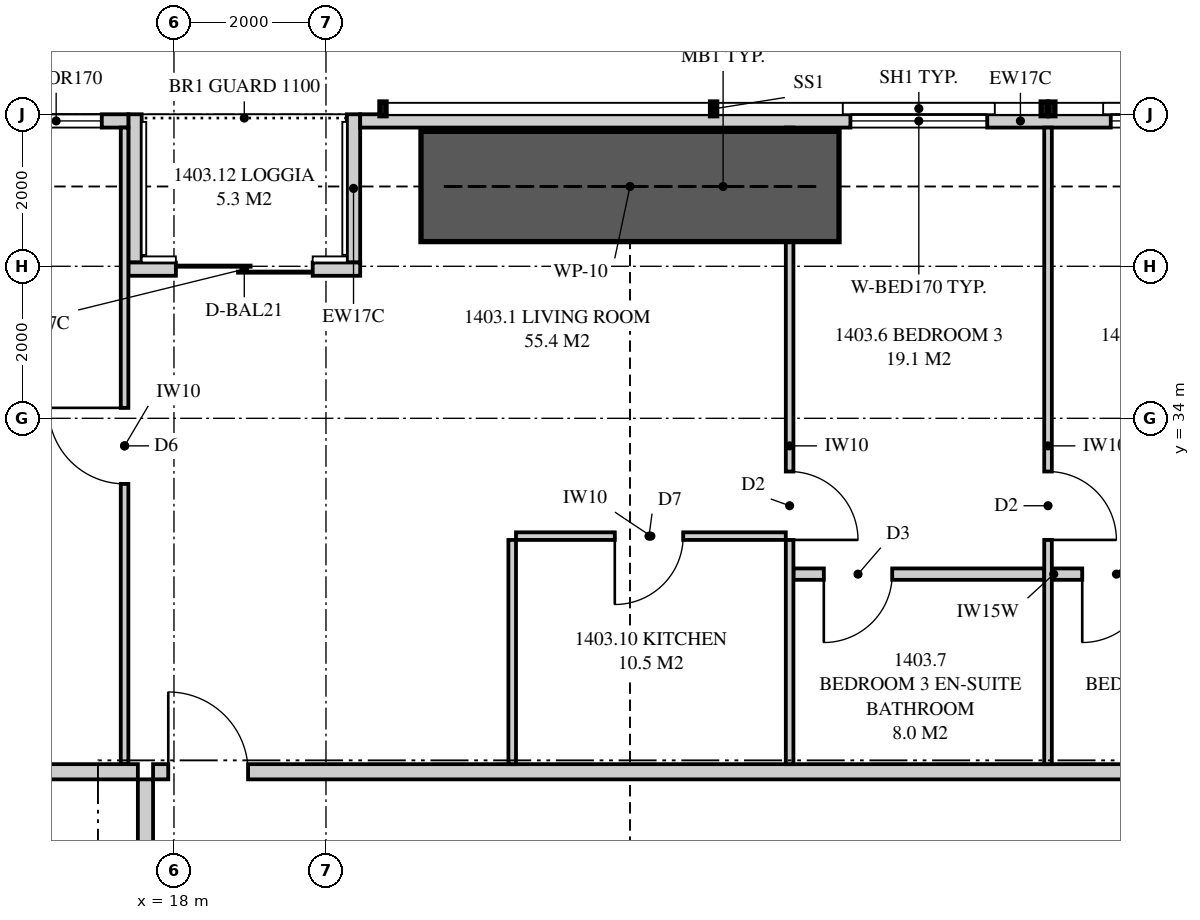
"""IFC4 building model, lengths in metres.
Left out: names, types, materials, properties, quantities, classifications, styles, units other than length and angle.
Written with IfcOpenShell. Run it as: python <this file> out.ifc"""

import sys

from ifc_helpers import new_model, si_unit, direction, frame, frame_2d, origin, place, context, subcontext, project, spatial, polyline, rectangle, outline, extrude, element, fill, save


model = new_model("IFC4")
c1 = context("Model", 3, precision=1e-05, world=origin(), true_north=direction((0.0, 1.0)))
c2 = subcontext(c1, "Body", "Model", "MODEL_VIEW")
j1 = project(units=[si_unit("LENGTHUNIT", "METRE"), si_unit("PLANEANGLEUNIT", "RADIAN")], contexts=[c1])
p1 = place(None, origin())
s1 = spatial("IfcSite", under=j1, at=p1, CompositionType="ELEMENT")
p2 = place(p1, origin())
s2 = spatial("IfcBuilding", under=s1, at=p2, CompositionType="ELEMENT")
p3 = place(p2, frame((0.0, 0.0, 54.5)))
s3 = spatial("IfcBuildingStorey", under=s2, at=p3, CompositionType="ELEMENT", Elevation=54.5)
p4 = place(p3, frame((37.824, 37.913, 0.0), z_axis=(0.0, 0.0, 1.0), x_axis=(-1.0, 0.0, 0.0)))
e1 = element("IfcWall", 1, at=p4, inside=s3, PredefinedType="SOLIDWALL", context=c2, shape_type="SweptSolid", body=[
    extrude(outline(polyline([(0.0, 0.0), (17.374, 0.0), (17.374, 2.15), (2.824, 2.15), (2.824, 3.11), (2.668, 3.11), (2.668, 2.15), (2.62, 2.15), (2.62, 3.11), (0.0, 3.11), (0.0, 0.0)])), frame((0.0, 0.087, 0.0), z_axis=(0.0, -1.0, 0.0), x_axis=(1.0, 0.0, 0.0)), (0.0, 0.0, 1.0), 0.175),
])
p5 = place(p4, frame((5.699, 0.0, 0.4)))
e2 = element("IfcOpeningElement", 2, at=p5, cuts=e1, PredefinedType="OPENING", context=c2, shape_type="SweptSolid", body=[
    extrude(rectangle(XDim=1.8, YDim=1.7, at=frame_2d((0.9, 0.85))), frame((0.0, 0.097, 0.0), z_axis=(0.0, -1.0, 0.0), x_axis=(1.0, 0.0, 0.0)), (0.0, 0.0, 1.0), 0.195),
])
p6 = place(p4, frame((9.124, 0.0, 0.4)))
e3 = element("IfcOpeningElement", 3, at=p6, cuts=e1, PredefinedType="OPENING", context=c2, shape_type="SweptSolid", body=[
    extrude(rectangle(XDim=1.8, YDim=1.7, at=frame_2d((0.9, 0.85))), frame((0.0, 0.097, 0.0), z_axis=(0.0, -1.0, 0.0), x_axis=(1.0, 0.0, 0.0)), (0.0, 0.0, 1.0), 0.195),
])
p7 = place(p3, frame((17.4, 37.913, 0.0), z_axis=(0.0, 0.0, 1.0), x_axis=(-1.0, 0.0, 0.0)))
e4 = element("IfcWall", 4, at=p7, inside=s3, PredefinedType="SOLIDWALL", context=c2, shape_type="SweptSolid", body=[
    extrude(outline(polyline([(0.0, 0.0), (12.349, 0.0), (12.349, 3.11), (4.604, 3.11), (4.604, 2.15), (4.556, 2.15), (4.556, 3.11), (4.4, 3.11), (4.4, 2.15), (0.0, 2.15), (0.0, 0.0)])), frame((0.0, 0.087, 0.0), z_axis=(0.0, -1.0, 0.0), x_axis=(1.0, 0.0, 0.0)), (0.0, 0.0, 1.0), 0.175),
])
p8 = place(p7, frame((0.35, 0.0, 0.4)))
e5 = element("IfcOpeningElement", 5, at=p8, cuts=e4, PredefinedType="OPENING", context=c2, shape_type="SweptSolid", body=[
    extrude(rectangle(XDim=1.2, YDim=1.7, at=frame_2d((0.6, 0.85))), frame((0.0, 0.097, 0.0), z_axis=(0.0, -1.0, 0.0), x_axis=(1.0, 0.0, 0.0)), (0.0, 0.0, 1.0), 0.195),
])
p9 = place(p7, frame((8.3, 0.0, 0.4)))
e6 = element("IfcOpeningElement", 6, at=p9, cuts=e4, PredefinedType="OPENING", context=c2, shape_type="SweptSolid", body=[
    extrude(rectangle(XDim=1.8, YDim=1.7, at=frame_2d((0.9, 0.85))), frame((0.0, 0.097, 0.0), z_axis=(0.0, -1.0, 0.0), x_axis=(1.0, 0.0, 0.0)), (0.0, 0.0, 1.0), 0.195),
])
p10 = place(p3, frame((20.45, 35.962, 0.0), z_axis=(0.0, 0.0, 1.0), x_axis=(-1.0, 0.0, 0.0)))
e7 = element("IfcWall", 7, at=p10, inside=s3, PredefinedType="SOLIDWALL", context=c2, shape_type="SweptSolid", body=[
    extrude(rectangle(XDim=3.05, YDim=0.175, at=frame_2d((1.525, 0.0))), origin(), (0.0, 0.0, 1.0), 3.11),
])
p11 = place(p10, frame((0.625, 0.0, 0.0)))
e8 = element("IfcOpeningElement", 8, at=p11, cuts=e7, PredefinedType="OPENING", context=c2, shape_type="SweptSolid", body=[
    extrude(rectangle(XDim=1.8, YDim=2.1, at=frame_2d((0.9, 1.05))), frame((0.0, 0.097, 0.0), z_axis=(0.0, -1.0, 0.0), x_axis=(1.0, 0.0, 0.0)), (0.0, 0.0, 1.0), 0.195),
])
for number, where, z_axis, x_axis in (
    (9, (20.363, 38.0, 0.0), (0.0, 0.0, 1.0), (0.0, -1.0, 0.0)),
    (10, (17.488, 38.0, 0.0), (0.0, 0.0, 1.0), (0.0, -1.0, 0.0)),
):
    element("IfcWall", number, at=place(p3, frame(where, z_axis=z_axis, x_axis=x_axis)), inside=s3, PredefinedType="SOLIDWALL", context=c2, shape_type="SweptSolid", body=[
        extrude(outline(polyline([(0.0, 0.0), (1.95, 0.0), (1.95, 3.11), (1.75, 3.11), (1.75, 2.15), (0.15, 2.15), (0.15, 3.11), (0.0, 3.11), (0.0, 0.0)])), frame((0.0, 0.087, 0.0), z_axis=(0.0, -1.0, 0.0), x_axis=(1.0, 0.0, 0.0)), (0.0, 0.0, 1.0), 0.175),
    ])
p12 = place(p3, frame((17.725, 29.35, 0.0), z_axis=(0.0, 0.0, 1.0), x_axis=(1.0, 0.0, 0.0)))
e11 = element("IfcWall", 11, at=p12, inside=s3, PredefinedType="PARTITIONING", context=c2, shape_type="SweptSolid", body=[
    extrude(outline(polyline([(0.0, 0.0), (15.275, 0.0), (15.275, 3.11), (6.612, 3.11), (6.612, 2.541), (5.938, 2.541), (5.938, 3.11), (0.0, 3.11), (0.0, 0.0)])), frame((0.0, 0.1, 0.0), z_axis=(0.0, -1.0, 0.0), x_axis=(1.0, 0.0, 0.0)), (0.0, 0.0, 1.0), 0.2),
])
p13 = place(p12, frame((0.2, 0.0, 0.0)))
e12 = element("IfcOpeningElement", 12, at=p13, cuts=e11, PredefinedType="OPENING", context=c2, shape_type="SweptSolid", body=[
    extrude(rectangle(XDim=1.05, YDim=2.2, at=frame_2d((0.525, 1.1))), frame((0.0, 0.11, 0.0), z_axis=(0.0, -1.0, 0.0), x_axis=(1.0, 0.0, 0.0)), (0.0, 0.0, 1.0), 0.22),
])
p14 = place(p3, frame((26.1, 37.825, 0.0), z_axis=(0.0, 0.0, 1.0), x_axis=(0.0, -1.0, 0.0)))
e13 = element("IfcWall", 13, at=p14, inside=s3, PredefinedType="PARTITIONING", context=c2, shape_type="SweptSolid", body=[
    extrude(outline(polyline([(0.529, 2.15), (0.0, 2.15), (0.0, 0.0), (0.529, 0.0), (0.529, 0.034), (1.021, 0.034), (1.021, 0.0), (8.375, 0.0), (8.375, 3.11), (1.635, 3.11), (1.635, 2.15), (1.021, 2.15), (1.021, 2.116), (0.529, 2.116), (0.529, 2.15)])), frame((0.0, 0.05, 0.0), z_axis=(0.0, -1.0, 0.0), x_axis=(1.0, 0.0, 0.0)), (0.0, 0.0, 1.0), 0.1),
])
p15 = place(p14, frame((4.525, 0.0, 0.0)))
e14 = element("IfcOpeningElement", 14, at=p15, cuts=e13, PredefinedType="OPENING", context=c2, shape_type="SweptSolid", body=[
    extrude(rectangle(XDim=0.9, YDim=2.1, at=frame_2d((0.45, 1.05))), frame((0.0, 0.06, 0.0), z_axis=(0.0, -1.0, 0.0), x_axis=(1.0, 0.0, 0.0)), (0.0, 0.0, 1.0), 0.12),
])
p16 = place(p3, frame((29.5, 37.825, 0.0), z_axis=(0.0, 0.0, 1.0), x_axis=(0.0, -1.0, 0.0)))
e15 = element("IfcWall", 15, at=p16, inside=s3, PredefinedType="PARTITIONING", context=c2, shape_type="SweptSolid", body=[
    extrude(outline(polyline([(0.0, 0.0), (8.375, 0.0), (8.375, 3.11), (1.635, 3.11), (1.635, 2.15), (0.0, 2.15), (0.0, 3.11), (0.0, 0.0)])), frame((0.0, 0.05, 0.0), z_axis=(0.0, -1.0, 0.0), x_axis=(1.0, 0.0, 0.0)), (0.0, 0.0, 1.0), 0.1),
])
p17 = place(p16, frame((4.525, 0.0, 0.0)))
e16 = element("IfcOpeningElement", 16, at=p17, cuts=e15, PredefinedType="OPENING", context=c2, shape_type="SweptSolid", body=[
    extrude(rectangle(XDim=0.9, YDim=2.1, at=frame_2d((0.45, 1.05))), frame((0.0, 0.06, 0.0), z_axis=(0.0, -1.0, 0.0), x_axis=(1.0, 0.0, 0.0)), (0.0, 0.0, 1.0), 0.12),
])
p18 = place(p3, frame((26.15, 31.95, 0.0), z_axis=(0.0, 0.0, 1.0), x_axis=(1.0, 0.0, 0.0)))
e17 = element("IfcWall", 17, at=p18, inside=s3, PredefinedType="PLUMBINGWALL", context=c2, shape_type="SweptSolid", body=[
    extrude(rectangle(XDim=3.3, YDim=0.15, at=frame_2d((1.65, 0.0))), origin(), (0.0, 0.0, 1.0), 3.11),
])
p19 = place(p18, frame((0.4, 0.0, 0.0)))
e18 = element("IfcOpeningElement", 18, at=p19, cuts=e17, PredefinedType="OPENING", context=c2, shape_type="SweptSolid", body=[
    extrude(rectangle(XDim=0.9, YDim=2.1, at=frame_2d((0.45, 1.05))), frame((0.0, 0.085, 0.0), z_axis=(0.0, -1.0, 0.0), x_axis=(1.0, 0.0, 0.0)), (0.0, 0.0, 1.0), 0.17),
])
p20 = place(p3, frame((29.55, 31.95, 0.0), z_axis=(0.0, 0.0, 1.0), x_axis=(1.0, 0.0, 0.0)))
e19 = element("IfcWall", 19, at=p20, inside=s3, PredefinedType="PLUMBINGWALL", context=c2, shape_type="SweptSolid", body=[
    extrude(rectangle(XDim=3.45, YDim=0.15, at=frame_2d((1.725, 0.0))), origin(), (0.0, 0.0, 1.0), 3.11),
])
p21 = place(p20, frame((0.4, 0.0, 0.0)))
e20 = element("IfcOpeningElement", 20, at=p21, cuts=e19, PredefinedType="OPENING", context=c2, shape_type="SweptSolid", body=[
    extrude(rectangle(XDim=0.9, YDim=2.1, at=frame_2d((0.45, 1.05))), frame((0.0, 0.085, 0.0), z_axis=(0.0, -1.0, 0.0), x_axis=(1.0, 0.0, 0.0)), (0.0, 0.0, 1.0), 0.17),
])
p22 = place(p3, frame((22.5, 32.45, 0.0), z_axis=(0.0, 0.0, 1.0), x_axis=(1.0, 0.0, 0.0)))
e21 = element("IfcWall", 21, at=p22, inside=s3, PredefinedType="PARTITIONING", context=c2, shape_type="SweptSolid", body=[
    extrude(outline(polyline([(0.0, 0.0), (3.55, 0.0), (3.55, 3.11), (1.787, 3.11), (1.787, 2.541), (1.213, 2.541), (1.213, 3.11), (0.0, 3.11), (0.0, 0.0)])), frame((0.0, 0.05, 0.0), z_axis=(0.0, -1.0, 0.0), x_axis=(1.0, 0.0, 0.0)), (0.0, 0.0, 1.0), 0.1),
])
p23 = place(p22, frame((1.3, 0.0, 0.0)))
e22 = element("IfcOpeningElement", 22, at=p23, cuts=e21, PredefinedType="OPENING", context=c2, shape_type="SweptSolid", body=[
    extrude(rectangle(XDim=0.9, YDim=2.1, at=frame_2d((0.45, 1.05))), frame((0.0, 0.06, 0.0), z_axis=(0.0, -1.0, 0.0), x_axis=(1.0, 0.0, 0.0)), (0.0, 0.0, 1.0), 0.12),
])
p24 = place(p3, frame((22.45, 32.4, 0.0), z_axis=(0.0, 0.0, 1.0), x_axis=(0.0, -1.0, 0.0)))
e23 = element("IfcWall", 23, at=p24, inside=s3, PredefinedType="PARTITIONING", context=c2, shape_type="SweptSolid", body=[
    extrude(rectangle(XDim=2.95, YDim=0.1, at=frame_2d((1.475, 0.0))), origin(), (0.0, 0.0, 1.0), 3.11),
])
p25 = place(p3, frame((17.35, 37.825, 0.0), z_axis=(0.0, 0.0, 1.0), x_axis=(0.0, -1.0, 0.0)))
e24 = element("IfcWall", 24, at=p25, inside=s3, PredefinedType="PARTITIONING", context=c2, shape_type="SweptSolid", body=[
    extrude(outline(polyline([(0.0, 0.0), (8.375, 0.0), (8.375, 3.11), (1.635, 3.11), (1.635, 2.15), (0.0, 2.15), (0.0, 3.11), (0.0, 0.0)])), frame((0.0, 0.05, 0.0), z_axis=(0.0, -1.0, 0.0), x_axis=(1.0, 0.0, 0.0)), (0.0, 0.0, 1.0), 0.1),
])
p26 = place(p25, frame((3.688, 0.0, 0.0)))
e25 = element("IfcOpeningElement", 25, at=p26, cuts=e24, PredefinedType="OPENING", context=c2, shape_type="SweptSolid", body=[
    extrude(rectangle(XDim=1.0, YDim=2.1, at=frame_2d((0.5, 1.05))), frame((0.0, 0.06, 0.0), z_axis=(0.0, -1.0, 0.0), x_axis=(1.0, 0.0, 0.0)), (0.0, 0.0, 1.0), 0.12),
])
p27 = place(p3, frame((2.0, 29.35, 0.0), z_axis=(0.0, 0.0, 1.0), x_axis=(1.0, 0.0, 0.0)))
e26 = element("IfcWall", 26, at=p27, inside=s3, PredefinedType="PARTITIONING", context=c2, shape_type="SweptSolid", body=[
    extrude(outline(polyline([(0.0, 0.0), (15.525, 0.0), (15.525, 3.11), (11.337, 3.11), (11.337, 2.541), (10.663, 2.541), (10.663, 3.11), (9.51, 3.11), (9.51, 2.51), (6.89, 2.51), (6.89, 3.11), (2.969, 3.11), (2.969, 2.541), (2.577, 2.541), (2.577, 2.15), (0.733, 2.15), (0.733, 3.11), (0.0, 3.11), (0.0, 0.0)])), frame((0.0, 0.1, 0.0), z_axis=(0.0, -1.0, 0.0), x_axis=(1.0, 0.0, 0.0)), (0.0, 0.0, 1.0), 0.2),
])
p28 = place(p3, frame((17.625, 24.2, 0.0), z_axis=(0.0, 0.0, 1.0), x_axis=(0.0, 1.0, 0.0)))
e27 = element("IfcWall", 27, at=p28, inside=s3, PredefinedType="PARTITIONING", context=c2, shape_type="SweptSolid", body=[
    extrude(outline(polyline([(0.0, 0.0), (5.05, 0.0), (5.05, 3.11), (1.137, 3.11), (1.137, 2.541), (0.463, 2.541), (0.463, 3.11), (0.0, 3.11), (0.0, 0.0)])), frame((0.0, 0.1, 0.0), z_axis=(0.0, -1.0, 0.0), x_axis=(1.0, 0.0, 0.0)), (0.0, 0.0, 1.0), 0.2),
])
p29 = place(p28, frame((1.075, 0.0, 0.0)))
e28 = element("IfcOpeningElement", 28, at=p29, cuts=e27, PredefinedType="OPENING", context=c2, shape_type="SweptSolid", body=[
    extrude(rectangle(XDim=1.8, YDim=2.1, at=frame_2d((0.9, 1.05))), frame((0.0, 0.11, 0.0), z_axis=(0.0, -1.0, 0.0), x_axis=(1.0, 0.0, 0.0)), (0.0, 0.0, 1.0), 0.22),
])
p30 = place(p3, frame((21.25, 37.05, 0.0), z_axis=(0.0, 0.0, 1.0), x_axis=(1.0, 0.0, 0.0)))
e29 = element("IfcWall", 29, at=p30, inside=s3, PredefinedType="SHEAR", context=c2, shape_type="SweptSolid", body=[
    extrude(rectangle(XDim=5.5, YDim=1.45, at=frame_2d((2.75, 0.0))), origin(), (0.0, 0.0, 1.0), 3.35),
])
p31 = place(p5, origin())
e30 = element("IfcWindow", 30, at=p31, inside=s3, PartitioningType="SINGLE_PANEL", PredefinedType="WINDOW", context=c2, shape_type="SweptSolid", body=[
    extrude(rectangle(XDim=1.8, YDim=1.7, at=frame_2d((0.9, 0.85))), frame((0.0, 0.03, 0.0), z_axis=(0.0, -1.0, 0.0), x_axis=(1.0, 0.0, 0.0)), (0.0, 0.0, 1.0), 0.06),
])
fill(e2, e30)
p32 = place(p6, origin())
e31 = element("IfcWindow", 31, at=p32, inside=s3, PartitioningType="SINGLE_PANEL", PredefinedType="WINDOW", context=c2, shape_type="SweptSolid", body=[
    extrude(rectangle(XDim=1.8, YDim=1.7, at=frame_2d((0.9, 0.85))), frame((0.0, 0.03, 0.0), z_axis=(0.0, -1.0, 0.0), x_axis=(1.0, 0.0, 0.0)), (0.0, 0.0, 1.0), 0.06),
])
fill(e3, e31)
p33 = place(p11, origin())
e32 = element("IfcDoor", 32, at=p33, inside=s3, OperationType="SLIDING_TO_LEFT", PredefinedType="DOOR", context=c2, shape_type="SweptSolid", body=[
    extrude(rectangle(XDim=1.8, YDim=2.1, at=frame_2d((0.9, 1.05))), frame((0.0, 0.025, 0.0), z_axis=(0.0, -1.0, 0.0), x_axis=(1.0, 0.0, 0.0)), (0.0, 0.0, 1.0), 0.05),
])
fill(e8, e32)
p34 = place(p8, origin())
e33 = element("IfcWindow", 33, at=p34, inside=s3, PartitioningType="SINGLE_PANEL", PredefinedType="WINDOW", context=c2, shape_type="SweptSolid", body=[
    extrude(rectangle(XDim=1.2, YDim=1.7, at=frame_2d((0.6, 0.85))), frame((0.0, 0.03, 0.0), z_axis=(0.0, -1.0, 0.0), x_axis=(1.0, 0.0, 0.0)), (0.0, 0.0, 1.0), 0.06),
])
fill(e5, e33)
p35 = place(p13, origin())
e34 = element("IfcDoor", 34, at=p35, inside=s3, OperationType="SINGLE_SWING_LEFT", PredefinedType="DOOR", context=c2, shape_type="SweptSolid", body=[
    extrude(rectangle(XDim=1.05, YDim=2.2, at=frame_2d((0.525, 1.1))), frame((0.0, 0.025, 0.0), z_axis=(0.0, -1.0, 0.0), x_axis=(1.0, 0.0, 0.0)), (0.0, 0.0, 1.0), 0.05),
])
fill(e12, e34)
p36 = place(p15, origin())
e35 = element("IfcDoor", 35, at=p36, inside=s3, OperationType="SINGLE_SWING_RIGHT", PredefinedType="DOOR", context=c2, shape_type="SweptSolid", body=[
    extrude(rectangle(XDim=0.9, YDim=2.1, at=frame_2d((0.45, 1.05))), frame((0.0, 0.025, 0.0), z_axis=(0.0, -1.0, 0.0), x_axis=(1.0, 0.0, 0.0)), (0.0, 0.0, 1.0), 0.05),
])
fill(e14, e35)
p37 = place(p19, frame((0.9, 0.0, 0.0), z_axis=(0.0, 0.0, 1.0), x_axis=(-1.0, 0.0, 0.0)))
e36 = element("IfcDoor", 36, at=p37, inside=s3, OperationType="SINGLE_SWING_RIGHT", PredefinedType="DOOR", context=c2, shape_type="SweptSolid", body=[
    extrude(rectangle(XDim=0.9, YDim=2.1, at=frame_2d((0.45, 1.05))), frame((0.0, 0.025, 0.0), z_axis=(0.0, -1.0, 0.0), x_axis=(1.0, 0.0, 0.0)), (0.0, 0.0, 1.0), 0.05),
])
fill(e18, e36)
p38 = place(p17, origin())
e37 = element("IfcDoor", 37, at=p38, inside=s3, OperationType="SINGLE_SWING_RIGHT", PredefinedType="DOOR", context=c2, shape_type="SweptSolid", body=[
    extrude(rectangle(XDim=0.9, YDim=2.1, at=frame_2d((0.45, 1.05))), frame((0.0, 0.025, 0.0), z_axis=(0.0, -1.0, 0.0), x_axis=(1.0, 0.0, 0.0)), (0.0, 0.0, 1.0), 0.05),
])
fill(e16, e37)
p39 = place(p21, frame((0.9, 0.0, 0.0), z_axis=(0.0, 0.0, 1.0), x_axis=(-1.0, 0.0, 0.0)))
e38 = element("IfcDoor", 38, at=p39, inside=s3, OperationType="SINGLE_SWING_RIGHT", PredefinedType="DOOR", context=c2, shape_type="SweptSolid", body=[
    extrude(rectangle(XDim=0.9, YDim=2.1, at=frame_2d((0.45, 1.05))), frame((0.0, 0.025, 0.0), z_axis=(0.0, -1.0, 0.0), x_axis=(1.0, 0.0, 0.0)), (0.0, 0.0, 1.0), 0.05),
])
fill(e20, e38)
p40 = place(p23, frame((0.9, 0.0, 0.0), z_axis=(0.0, 0.0, 1.0), x_axis=(-1.0, 0.0, 0.0)))
e39 = element("IfcDoor", 39, at=p40, inside=s3, OperationType="SINGLE_SWING_RIGHT", PredefinedType="DOOR", context=c2, shape_type="SweptSolid", body=[
    extrude(rectangle(XDim=0.9, YDim=2.1, at=frame_2d((0.45, 1.05))), frame((0.0, 0.025, 0.0), z_axis=(0.0, -1.0, 0.0), x_axis=(1.0, 0.0, 0.0)), (0.0, 0.0, 1.0), 0.05),
])
fill(e22, e39)
p41 = place(p26, frame((1.0, 0.0, 0.0), z_axis=(0.0, 0.0, 1.0), x_axis=(-1.0, 0.0, 0.0)))
e40 = element("IfcDoor", 40, at=p41, inside=s3, OperationType="SINGLE_SWING_RIGHT", PredefinedType="DOOR", context=c2, shape_type="SweptSolid", body=[
    extrude(rectangle(XDim=1.0, YDim=2.1, at=frame_2d((0.5, 1.05))), frame((0.0, 0.025, 0.0), z_axis=(0.0, -1.0, 0.0), x_axis=(1.0, 0.0, 0.0)), (0.0, 0.0, 1.0), 0.05),
])
fill(e25, e40)
save(model, sys.argv[1])
